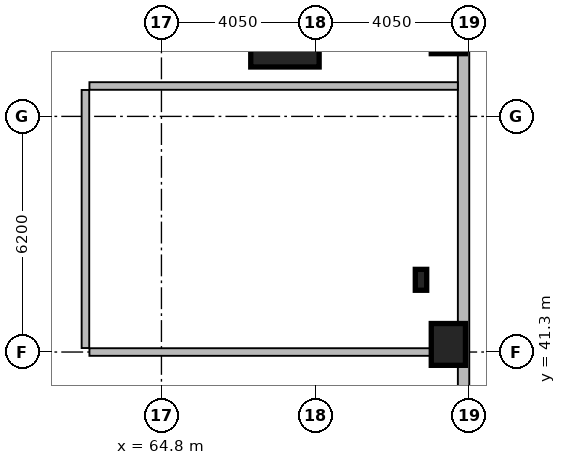
"""IFC4 building model, lengths in metres.
Left out: names, types, materials, properties, quantities, classifications, styles, units other than length and angle.
Written with IfcOpenShell. Run it as: python <this file> out.ifc"""

import sys

from ifc_helpers import new_model, si_unit, direction, frame, frame_2d, origin, origin_2d, place, context, subcontext, project, spatial, rectangle, hollow_rectangle, i_section, extrude, element, fill, save


model = new_model("IFC4")
c1 = context("Model", 3, precision=1e-05, world=origin(), true_north=direction((0.0, 1.0)))
c2 = subcontext(c1, "Body", "Model", "MODEL_VIEW")
j1 = project(units=[si_unit("LENGTHUNIT", "METRE"), si_unit("PLANEANGLEUNIT", "RADIAN")], contexts=[c1])
p1 = place(None, origin())
s1 = spatial("IfcSite", under=j1, at=p1, CompositionType="ELEMENT")
p2 = place(p1, origin())
s2 = spatial("IfcBuilding", under=s1, at=p2, CompositionType="ELEMENT")
p3 = place(p2, origin())
s3 = spatial("IfcBuildingStorey", under=s2, at=p3, CompositionType="ELEMENT", Elevation=0.0)
p4 = place(p3, frame((68.05, 49.7, 0.0), z_axis=(0.0, 0.0, 1.0), x_axis=(1.0, 0.0, 0.0)))
e1 = element("IfcColumn", 1, at=p4, inside=s3, PredefinedType="COLUMN", context=c2, shape_type="SweptSolid", body=[
    extrude(hollow_rectangle(XDim=1.8, YDim=1.8, WallThickness=0.08, at=origin_2d()), origin(), (0.0, 0.0, 1.0), 5.4),
])
p5 = place(p3, frame((71.63, 43.2, 0.0), z_axis=(0.0, 0.0, 1.0), x_axis=(1.0, 0.0, 0.0)))
e2 = element("IfcColumn", 2, at=p5, inside=s3, PredefinedType="COLUMN", context=c2, shape_type="SweptSolid", body=[
    extrude(i_section(OverallWidth=0.3, OverallDepth=0.55, WebThickness=0.015, FlangeThickness=0.029, at=origin_2d()), origin(), (0.0, 0.0, 1.0), 5.4),
])
for number, where, z_axis, x_axis in (
    (3, (72.35, 49.7, 0.0), (0.0, 0.0, 1.0), (1.0, 0.0, 0.0)),
    (4, (72.35, 41.5, 0.0), (0.0, 0.0, 1.0), (1.0, 0.0, 0.0)),
):
    element("IfcColumn", number, at=place(p3, frame(where, z_axis=z_axis, x_axis=x_axis)), inside=s3, PredefinedType="PILASTER", context=c2, shape_type="SweptSolid", body=[
        extrude(rectangle(XDim=0.9, YDim=1.1, at=origin_2d()), origin(), (0.0, 0.0, 1.0), 5.4),
    ])
p6 = place(p3, frame((72.75, 0.3, 0.0), z_axis=(0.0, 0.0, 1.0), x_axis=(0.0, 1.0, 0.0)))
e5 = element("IfcWall", 5, at=p6, inside=s3, PredefinedType="SOLIDWALL", context=c2, shape_type="SweptSolid", body=[
    extrude(rectangle(XDim=49.275, YDim=0.3, at=frame_2d((24.637, 0.0))), origin(), (0.0, 0.0, 1.0), 4.54),
])
p7 = place(p6, frame((0.3, 0.0, 0.0)))
e6 = element("IfcOpeningElement", 6, at=p7, cuts=e5, PredefinedType="OPENING", context=c2, shape_type="SweptSolid", body=[
    extrude(rectangle(XDim=6.5, YDim=3.2, at=frame_2d((3.25, 1.6))), frame((0.0, 0.16, 0.0), z_axis=(0.0, -1.0, 0.0), x_axis=(1.0, 0.0, 0.0)), (0.0, 0.0, 1.0), 0.32),
])
p8 = place(p6, frame((44.8, 0.0, 0.0)))
e7 = element("IfcOpeningElement", 7, at=p8, cuts=e5, PredefinedType="OPENING", context=c2, shape_type="SweptSolid", body=[
    extrude(rectangle(XDim=1.1, YDim=2.25, at=frame_2d((0.55, 1.125))), frame((0.0, 0.16, 0.0), z_axis=(0.0, -1.0, 0.0), x_axis=(1.0, 0.0, 0.0)), (0.0, 0.0, 1.0), 0.32),
])
p9 = place(p6, frame((17.45, 0.0, 0.9)))
e8 = element("IfcOpeningElement", 8, at=p9, cuts=e5, PredefinedType="OPENING", context=c2, shape_type="SweptSolid", body=[
    extrude(rectangle(XDim=1.8, YDim=3.2, at=frame_2d((0.9, 1.6))), frame((0.0, 0.16, 0.0), z_axis=(0.0, -1.0, 0.0), x_axis=(1.0, 0.0, 0.0)), (0.0, 0.0, 1.0), 0.32),
])
p10 = place(p6, frame((25.75, 0.0, 0.9)))
e9 = element("IfcOpeningElement", 9, at=p10, cuts=e5, PredefinedType="OPENING", context=c2, shape_type="SweptSolid", body=[
    extrude(rectangle(XDim=1.8, YDim=3.2, at=frame_2d((0.9, 1.6))), frame((0.0, 0.16, 0.0), z_axis=(0.0, -1.0, 0.0), x_axis=(1.0, 0.0, 0.0)), (0.0, 0.0, 1.0), 0.32),
])
p11 = place(p6, frame((35.1, 0.0, 0.9)))
e10 = element("IfcOpeningElement", 10, at=p11, cuts=e5, PredefinedType="OPENING", context=c2, shape_type="SweptSolid", body=[
    extrude(rectangle(XDim=1.8, YDim=3.2, at=frame_2d((0.9, 1.6))), frame((0.0, 0.16, 0.0), z_axis=(0.0, -1.0, 0.0), x_axis=(1.0, 0.0, 0.0)), (0.0, 0.0, 1.0), 0.32),
])
p12 = place(p3, frame((62.8, 41.405, 0.0), z_axis=(0.0, 0.0, 1.0), x_axis=(0.0, 1.0, 0.0)))
e11 = element("IfcWall", 11, at=p12, inside=s3, PredefinedType="PARTITIONING", context=c2, shape_type="SweptSolid", body=[
    extrude(rectangle(XDim=6.79, YDim=0.2, at=frame_2d((3.395, 0.0))), origin(), (0.0, 0.0, 1.0), 4.29),
])
p13 = place(p12, frame((2.4, 0.0, 0.0)))
e12 = element("IfcOpeningElement", 12, at=p13, cuts=e11, PredefinedType="OPENING", context=c2, shape_type="SweptSolid", body=[
    extrude(rectangle(XDim=1.05, YDim=2.15, at=frame_2d((0.525, 1.075))), frame((0.0, 0.11, 0.0), z_axis=(0.0, -1.0, 0.0), x_axis=(1.0, 0.0, 0.0)), (0.0, 0.0, 1.0), 0.22),
])
for number, where, z_axis, x_axis in (
    (13, (62.905, 41.3, 0.0), (0.0, 0.0, 1.0), (1.0, 0.0, 0.0)),
    (14, (62.905, 48.3, 0.0), (0.0, 0.0, 1.0), (1.0, 0.0, 0.0)),
):
    element("IfcWall", number, at=place(p3, frame(where, z_axis=z_axis, x_axis=x_axis)), inside=s3, PredefinedType="PARTITIONING", context=c2, shape_type="SweptSolid", body=[
        extrude(rectangle(XDim=9.695, YDim=0.2, at=frame_2d((4.848, 0.0))), origin(), (0.0, 0.0, 1.0), 4.54),
    ])
p14 = place(p8, origin())
e15 = element("IfcDoor", 15, at=p14, inside=s3, OperationType="SINGLE_SWING_RIGHT", PredefinedType="DOOR", context=c2, shape_type="SweptSolid", body=[
    extrude(rectangle(XDim=1.1, YDim=2.25, at=frame_2d((0.55, 1.125))), frame((0.0, 0.025, 0.0), z_axis=(0.0, -1.0, 0.0), x_axis=(1.0, 0.0, 0.0)), (0.0, 0.0, 1.0), 0.05),
])
fill(e7, e15)
p15 = place(p13, origin())
e16 = element("IfcDoor", 16, at=p15, inside=s3, OperationType="SINGLE_SWING_RIGHT", PredefinedType="DOOR", context=c2, shape_type="SweptSolid", body=[
    extrude(rectangle(XDim=1.05, YDim=2.15, at=frame_2d((0.525, 1.075))), frame((0.0, 0.025, 0.0), z_axis=(0.0, -1.0, 0.0), x_axis=(1.0, 0.0, 0.0)), (0.0, 0.0, 1.0), 0.05),
])
fill(e12, e16)
save(model, sys.argv[1])
